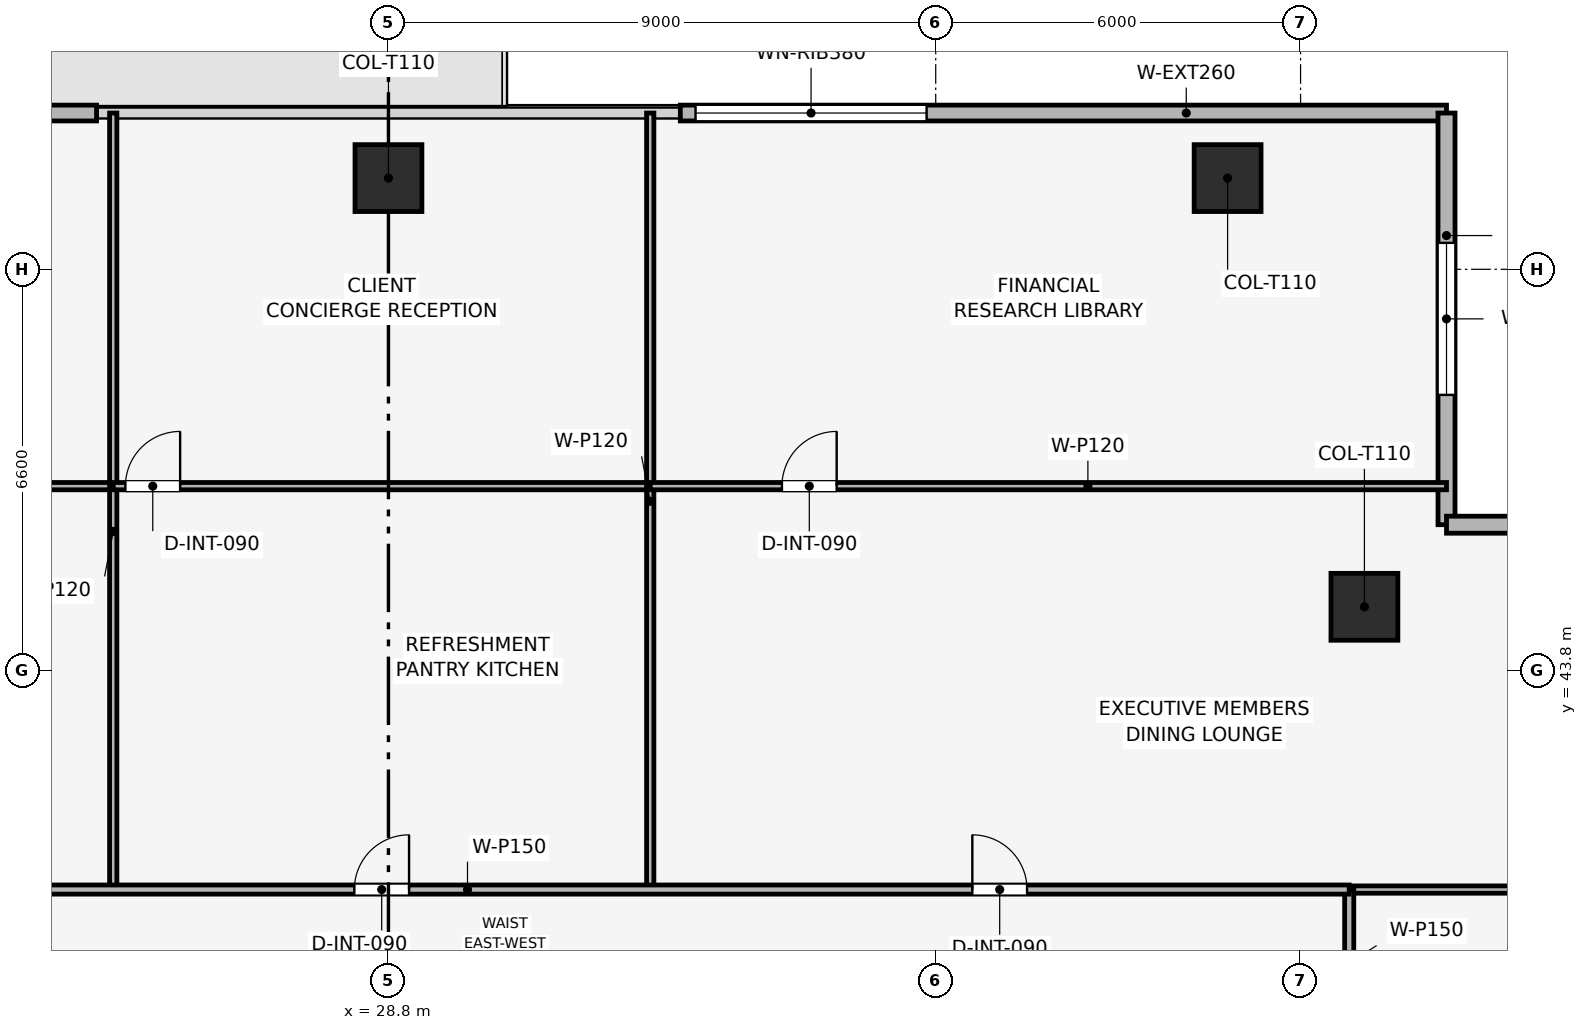
"""IFC4 building model, lengths in metres.
Left out: names, types, materials, properties, quantities, classifications, styles, units other than length and angle.
Written with IfcOpenShell. Run it as: python <this file> out.ifc"""

import sys

from ifc_helpers import new_model, si_unit, direction, frame, frame_2d, origin, origin_2d, place, context, subcontext, project, spatial, rectangle, extrude, element, fill, save


model = new_model("IFC4")
c1 = context("Model", 3, precision=1e-05, world=origin(), true_north=direction((0.0, 1.0)))
c2 = subcontext(c1, "Body", "Model", "MODEL_VIEW")
j1 = project(units=[si_unit("LENGTHUNIT", "METRE"), si_unit("PLANEANGLEUNIT", "RADIAN")], contexts=[c1])
p1 = place(None, origin())
s1 = spatial("IfcSite", under=j1, at=p1, CompositionType="ELEMENT")
p2 = place(p1, origin())
s2 = spatial("IfcBuilding", under=s1, at=p2, CompositionType="ELEMENT")
p3 = place(p2, frame((0.0, 0.0, 164.55)))
s3 = spatial("IfcBuildingStorey", under=s2, at=p3, CompositionType="ELEMENT", Elevation=164.55)
for number, where, z_axis, x_axis in (
    (1, (42.6, 51.9, 0.003), (0.0, 0.0, 1.0), (1.0, 0.0, 0.0)),
    (2, (28.8, 51.9, 0.003), (0.0, 0.0, 1.0), (1.0, 0.0, 0.0)),
    (3, (44.85, 44.85, 0.003), (0.0, 0.0, 1.0), (1.0, 0.0, 0.0)),
):
    element("IfcColumn", number, at=place(p3, frame(where, z_axis=z_axis, x_axis=x_axis)), inside=s3, PredefinedType="COLUMN", context=c2, shape_type="SweptSolid", body=[
        extrude(rectangle(XDim=1.1, YDim=1.1, at=origin_2d()), origin(), (0.0, 0.0, 1.0), 3.489),
    ])
p4 = place(p3, frame((11.4, 52.97, 0.0), z_axis=(0.0, 0.0, 1.0), x_axis=(1.0, 0.0, 0.0)))
e4 = element("IfcWall", 4, at=p4, inside=s3, PredefinedType="SOLIDWALL", context=c2, shape_type="SweptSolid", body=[
    extrude(rectangle(XDim=12.6, YDim=0.26, at=frame_2d((6.3, 0.0))), origin(), (0.0, 0.0, 1.0), 3.495),
])
p5 = place(p4, frame((7.901, 0.0, 0.0)))
e5 = element("IfcOpeningElement", 5, at=p5, cuts=e4, PredefinedType="OPENING", context=c2, shape_type="SweptSolid", body=[
    extrude(rectangle(XDim=1.1, YDim=2.2, at=frame_2d((0.55, 1.1))), frame((0.0, 0.14, 0.0), z_axis=(0.0, -1.0, 0.0), x_axis=(1.0, 0.0, 0.0)), (0.0, 0.0, 1.0), 0.28),
])
p6 = place(p3, frame((33.6, 52.97, 0.0), z_axis=(0.0, 0.0, 1.0), x_axis=(1.0, 0.0, 0.0)))
e6 = element("IfcWall", 6, at=p6, inside=s3, PredefinedType="SOLIDWALL", context=c2, shape_type="SweptSolid", body=[
    extrude(rectangle(XDim=12.6, YDim=0.26, at=frame_2d((6.3, 0.0))), origin(), (0.0, 0.0, 1.0), 3.495),
])
p7 = place(p6, frame((0.25, 0.0, 0.9)))
e7 = element("IfcOpeningElement", 7, at=p7, cuts=e6, PredefinedType="OPENING", context=c2, shape_type="SweptSolid", body=[
    extrude(rectangle(XDim=3.8, YDim=1.9, at=frame_2d((1.9, 0.95))), frame((0.0, 0.14, 0.0), z_axis=(0.0, -1.0, 0.0), x_axis=(1.0, 0.0, 0.0)), (0.0, 0.0, 1.0), 0.28),
])
p8 = place(p3, frame((46.2, 52.97, 0.0), z_axis=(0.0, 0.0, 1.0), x_axis=(0.0, -1.0, 0.0)))
e8 = element("IfcWall", 8, at=p8, inside=s3, PredefinedType="SOLIDWALL", context=c2, shape_type="SweptSolid", body=[
    extrude(rectangle(XDim=6.77, YDim=0.28, at=frame_2d((3.385, 0.0))), origin(), (0.0, 0.0, 1.0), 3.495),
])
p9 = place(p8, frame((2.135, 0.0, 0.9)))
e9 = element("IfcOpeningElement", 9, at=p9, cuts=e8, PredefinedType="OPENING", context=c2, shape_type="SweptSolid", body=[
    extrude(rectangle(XDim=2.5, YDim=1.9, at=frame_2d((1.25, 0.95))), frame((0.0, 0.15, 0.0), z_axis=(0.0, -1.0, 0.0), x_axis=(1.0, 0.0, 0.0)), (0.0, 0.0, 1.0), 0.3),
])
p10 = place(p3, frame((46.2, 46.2, 0.0), z_axis=(0.0, 0.0, 1.0), x_axis=(1.0, 0.0, 0.0)))
e10 = element("IfcWall", 10, at=p10, inside=s3, PredefinedType="SOLIDWALL", context=c2, shape_type="SweptSolid", body=[
    extrude(rectangle(XDim=6.77, YDim=0.28, at=frame_2d((3.385, 0.0))), origin(), (0.0, 0.0, 1.0), 3.495),
])
p11 = place(p10, frame((2.135, 0.0, 0.9)))
e11 = element("IfcOpeningElement", 11, at=p11, cuts=e10, PredefinedType="OPENING", context=c2, shape_type="SweptSolid", body=[
    extrude(rectangle(XDim=2.5, YDim=1.9, at=frame_2d((1.25, 0.95))), frame((0.0, 0.15, 0.0), z_axis=(0.0, -1.0, 0.0), x_axis=(1.0, 0.0, 0.0)), (0.0, 0.0, 1.0), 0.3),
])
p12 = place(p3, frame((15.443, 46.834, 0.0), z_axis=(0.0, 0.0, 1.0), x_axis=(1.0, 0.0, 0.0)))
e12 = element("IfcWall", 12, at=p12, inside=s3, PredefinedType="PARTITIONING", context=c2, shape_type="SweptSolid", body=[
    extrude(rectangle(XDim=8.831, YDim=0.12, at=frame_2d((4.416, 0.0))), origin(), (0.0, 0.0, 1.0), 3.03),
])
p13 = place(p12, frame((6.162, 0.0, 0.0)))
e13 = element("IfcOpeningElement", 13, at=p13, cuts=e12, PredefinedType="OPENING", context=c2, shape_type="SweptSolid", body=[
    extrude(rectangle(XDim=0.9, YDim=2.1, at=frame_2d((0.45, 1.05))), frame((0.0, 0.07, 0.0), z_axis=(0.0, -1.0, 0.0), x_axis=(1.0, 0.0, 0.0)), (0.0, 0.0, 1.0), 0.14),
])
p14 = place(p3, frame((24.274, 40.2, 0.0), z_axis=(0.0, 0.0, 1.0), x_axis=(0.0, 1.0, 0.0)))
e14 = element("IfcWall", 14, at=p14, inside=s3, PredefinedType="PARTITIONING", context=c2, shape_type="SweptSolid", body=[
    extrude(rectangle(XDim=12.77, YDim=0.12, at=frame_2d((6.385, 0.0))), origin(), (0.0, 0.0, 1.0), 2.98),
])
p15 = place(p3, frame((24.274, 46.834, 0.0), z_axis=(0.0, 0.0, 1.0), x_axis=(1.0, 0.0, 0.0)))
e15 = element("IfcWall", 15, at=p15, inside=s3, PredefinedType="PARTITIONING", context=c2, shape_type="SweptSolid", body=[
    extrude(rectangle(XDim=8.831, YDim=0.12, at=frame_2d((4.416, 0.0))), origin(), (0.0, 0.0, 1.0), 3.03),
])
p16 = place(p15, frame((0.2, 0.0, 0.0)))
e16 = element("IfcOpeningElement", 16, at=p16, cuts=e15, PredefinedType="OPENING", context=c2, shape_type="SweptSolid", body=[
    extrude(rectangle(XDim=0.9, YDim=2.1, at=frame_2d((0.45, 1.05))), frame((0.0, 0.07, 0.0), z_axis=(0.0, -1.0, 0.0), x_axis=(1.0, 0.0, 0.0)), (0.0, 0.0, 1.0), 0.14),
])
p17 = place(p3, frame((33.105, 40.2, 0.0), z_axis=(0.0, 0.0, 1.0), x_axis=(0.0, 1.0, 0.0)))
e17 = element("IfcWall", 17, at=p17, inside=s3, PredefinedType="PARTITIONING", context=c2, shape_type="SweptSolid", body=[
    extrude(rectangle(XDim=12.77, YDim=0.12, at=frame_2d((6.385, 0.0))), origin(), (0.0, 0.0, 1.0), 2.98),
])
p18 = place(p3, frame((33.105, 46.834, 0.0), z_axis=(0.0, 0.0, 1.0), x_axis=(1.0, 0.0, 0.0)))
e18 = element("IfcWall", 18, at=p18, inside=s3, PredefinedType="PARTITIONING", context=c2, shape_type="SweptSolid", body=[
    extrude(rectangle(XDim=13.095, YDim=0.12, at=frame_2d((6.547, 0.0))), origin(), (0.0, 0.0, 1.0), 2.98),
])
p19 = place(p18, frame((2.166, 0.0, 0.0)))
e19 = element("IfcOpeningElement", 19, at=p19, cuts=e18, PredefinedType="OPENING", context=c2, shape_type="SweptSolid", body=[
    extrude(rectangle(XDim=0.9, YDim=2.1, at=frame_2d((0.45, 1.05))), frame((0.0, 0.07, 0.0), z_axis=(0.0, -1.0, 0.0), x_axis=(1.0, 0.0, 0.0)), (0.0, 0.0, 1.0), 0.14),
])
p20 = place(p3, frame((44.6, 40.2, 0.0), z_axis=(0.0, 0.0, 1.0), x_axis=(1.0, 0.0, 0.0)))
e20 = element("IfcWall", 20, at=p20, inside=s3, PredefinedType="PARTITIONING", context=c2, shape_type="SweptSolid", body=[
    extrude(rectangle(XDim=8.37, YDim=0.12, at=frame_2d((4.185, 0.0))), origin(), (0.0, 0.0, 1.0), 2.98),
])
p21 = place(p3, frame((44.6, 37.8, 0.0), z_axis=(0.0, 0.0, 1.0), x_axis=(0.0, 1.0, 0.0)))
e21 = element("IfcWall", 21, at=p21, inside=s3, PredefinedType="PARTITIONING", context=c2, shape_type="SweptSolid", body=[
    extrude(rectangle(XDim=2.4, YDim=0.15, at=frame_2d((1.2, 0.0))), origin(), (0.0, 0.0, 1.0), 3.495),
])
p22 = place(p3, frame((13.0, 40.2, 0.0), z_axis=(0.0, 0.0, 1.0), x_axis=(1.0, 0.0, 0.0)))
e22 = element("IfcWall", 22, at=p22, inside=s3, PredefinedType="PARTITIONING", context=c2, shape_type="SweptSolid", body=[
    extrude(rectangle(XDim=31.6, YDim=0.15, at=frame_2d((15.8, 0.0))), origin(), (0.0, 0.0, 1.0), 3.03),
])
p23 = place(p22, frame((0.771, 0.0, 0.0)))
e23 = element("IfcOpeningElement", 23, at=p23, cuts=e22, PredefinedType="OPENING", context=c2, shape_type="SweptSolid", body=[
    extrude(rectangle(XDim=0.9, YDim=2.1, at=frame_2d((0.45, 1.05))), frame((0.0, 0.085, 0.0), z_axis=(0.0, -1.0, 0.0), x_axis=(1.0, 0.0, 0.0)), (0.0, 0.0, 1.0), 0.17),
])
p24 = place(p22, frame((6.409, 0.0, 0.0)))
e24 = element("IfcOpeningElement", 24, at=p24, cuts=e22, PredefinedType="OPENING", context=c2, shape_type="SweptSolid", body=[
    extrude(rectangle(XDim=0.9, YDim=2.1, at=frame_2d((0.45, 1.05))), frame((0.0, 0.085, 0.0), z_axis=(0.0, -1.0, 0.0), x_axis=(1.0, 0.0, 0.0)), (0.0, 0.0, 1.0), 0.17),
])
p25 = place(p22, frame((15.239, 0.0, 0.0)))
e25 = element("IfcOpeningElement", 25, at=p25, cuts=e22, PredefinedType="OPENING", context=c2, shape_type="SweptSolid", body=[
    extrude(rectangle(XDim=0.9, YDim=2.1, at=frame_2d((0.45, 1.05))), frame((0.0, 0.085, 0.0), z_axis=(0.0, -1.0, 0.0), x_axis=(1.0, 0.0, 0.0)), (0.0, 0.0, 1.0), 0.17),
])
p26 = place(p22, frame((25.402, 0.0, 0.0)))
e26 = element("IfcOpeningElement", 26, at=p26, cuts=e22, PredefinedType="OPENING", context=c2, shape_type="SweptSolid", body=[
    extrude(rectangle(XDim=0.9, YDim=2.1, at=frame_2d((0.45, 1.05))), frame((0.0, 0.085, 0.0), z_axis=(0.0, -1.0, 0.0), x_axis=(1.0, 0.0, 0.0)), (0.0, 0.0, 1.0), 0.17),
])
p27 = place(p7, origin())
e27 = element("IfcWindow", 27, at=p27, inside=s3, PartitioningType="SINGLE_PANEL", PredefinedType="WINDOW", context=c2, shape_type="SweptSolid", body=[
    extrude(rectangle(XDim=3.8, YDim=1.9, at=frame_2d((1.9, 0.95))), frame((0.0, 0.03, 0.0), z_axis=(0.0, -1.0, 0.0), x_axis=(1.0, 0.0, 0.0)), (0.0, 0.0, 1.0), 0.06),
])
fill(e7, e27)
p28 = place(p9, origin())
e28 = element("IfcWindow", 28, at=p28, inside=s3, PartitioningType="SINGLE_PANEL", PredefinedType="WINDOW", context=c2, shape_type="SweptSolid", body=[
    extrude(rectangle(XDim=2.5, YDim=1.9, at=frame_2d((1.25, 0.95))), frame((0.0, 0.03, 0.0), z_axis=(0.0, -1.0, 0.0), x_axis=(1.0, 0.0, 0.0)), (0.0, 0.0, 1.0), 0.06),
])
fill(e9, e28)
p29 = place(p16, origin())
e29 = element("IfcDoor", 29, at=p29, inside=s3, OperationType="SINGLE_SWING_RIGHT", PredefinedType="DOOR", context=c2, shape_type="SweptSolid", body=[
    extrude(rectangle(XDim=0.9, YDim=2.1, at=frame_2d((0.45, 1.05))), frame((0.0, 0.025, 0.0), z_axis=(0.0, -1.0, 0.0), x_axis=(1.0, 0.0, 0.0)), (0.0, 0.0, 1.0), 0.05),
])
fill(e16, e29)
p30 = place(p19, origin())
e30 = element("IfcDoor", 30, at=p30, inside=s3, OperationType="SINGLE_SWING_RIGHT", PredefinedType="DOOR", context=c2, shape_type="SweptSolid", body=[
    extrude(rectangle(XDim=0.9, YDim=2.1, at=frame_2d((0.45, 1.05))), frame((0.0, 0.025, 0.0), z_axis=(0.0, -1.0, 0.0), x_axis=(1.0, 0.0, 0.0)), (0.0, 0.0, 1.0), 0.05),
])
fill(e19, e30)
p31 = place(p25, origin())
e31 = element("IfcDoor", 31, at=p31, inside=s3, OperationType="SINGLE_SWING_RIGHT", PredefinedType="DOOR", context=c2, shape_type="SweptSolid", body=[
    extrude(rectangle(XDim=0.9, YDim=2.1, at=frame_2d((0.45, 1.05))), frame((0.0, 0.025, 0.0), z_axis=(0.0, -1.0, 0.0), x_axis=(1.0, 0.0, 0.0)), (0.0, 0.0, 1.0), 0.05),
])
fill(e25, e31)
p32 = place(p26, origin())
e32 = element("IfcDoor", 32, at=p32, inside=s3, OperationType="SINGLE_SWING_LEFT", PredefinedType="DOOR", context=c2, shape_type="SweptSolid", body=[
    extrude(rectangle(XDim=0.9, YDim=2.1, at=frame_2d((0.45, 1.05))), frame((0.0, 0.025, 0.0), z_axis=(0.0, -1.0, 0.0), x_axis=(1.0, 0.0, 0.0)), (0.0, 0.0, 1.0), 0.05),
])
fill(e26, e32)
save(model, sys.argv[1])
